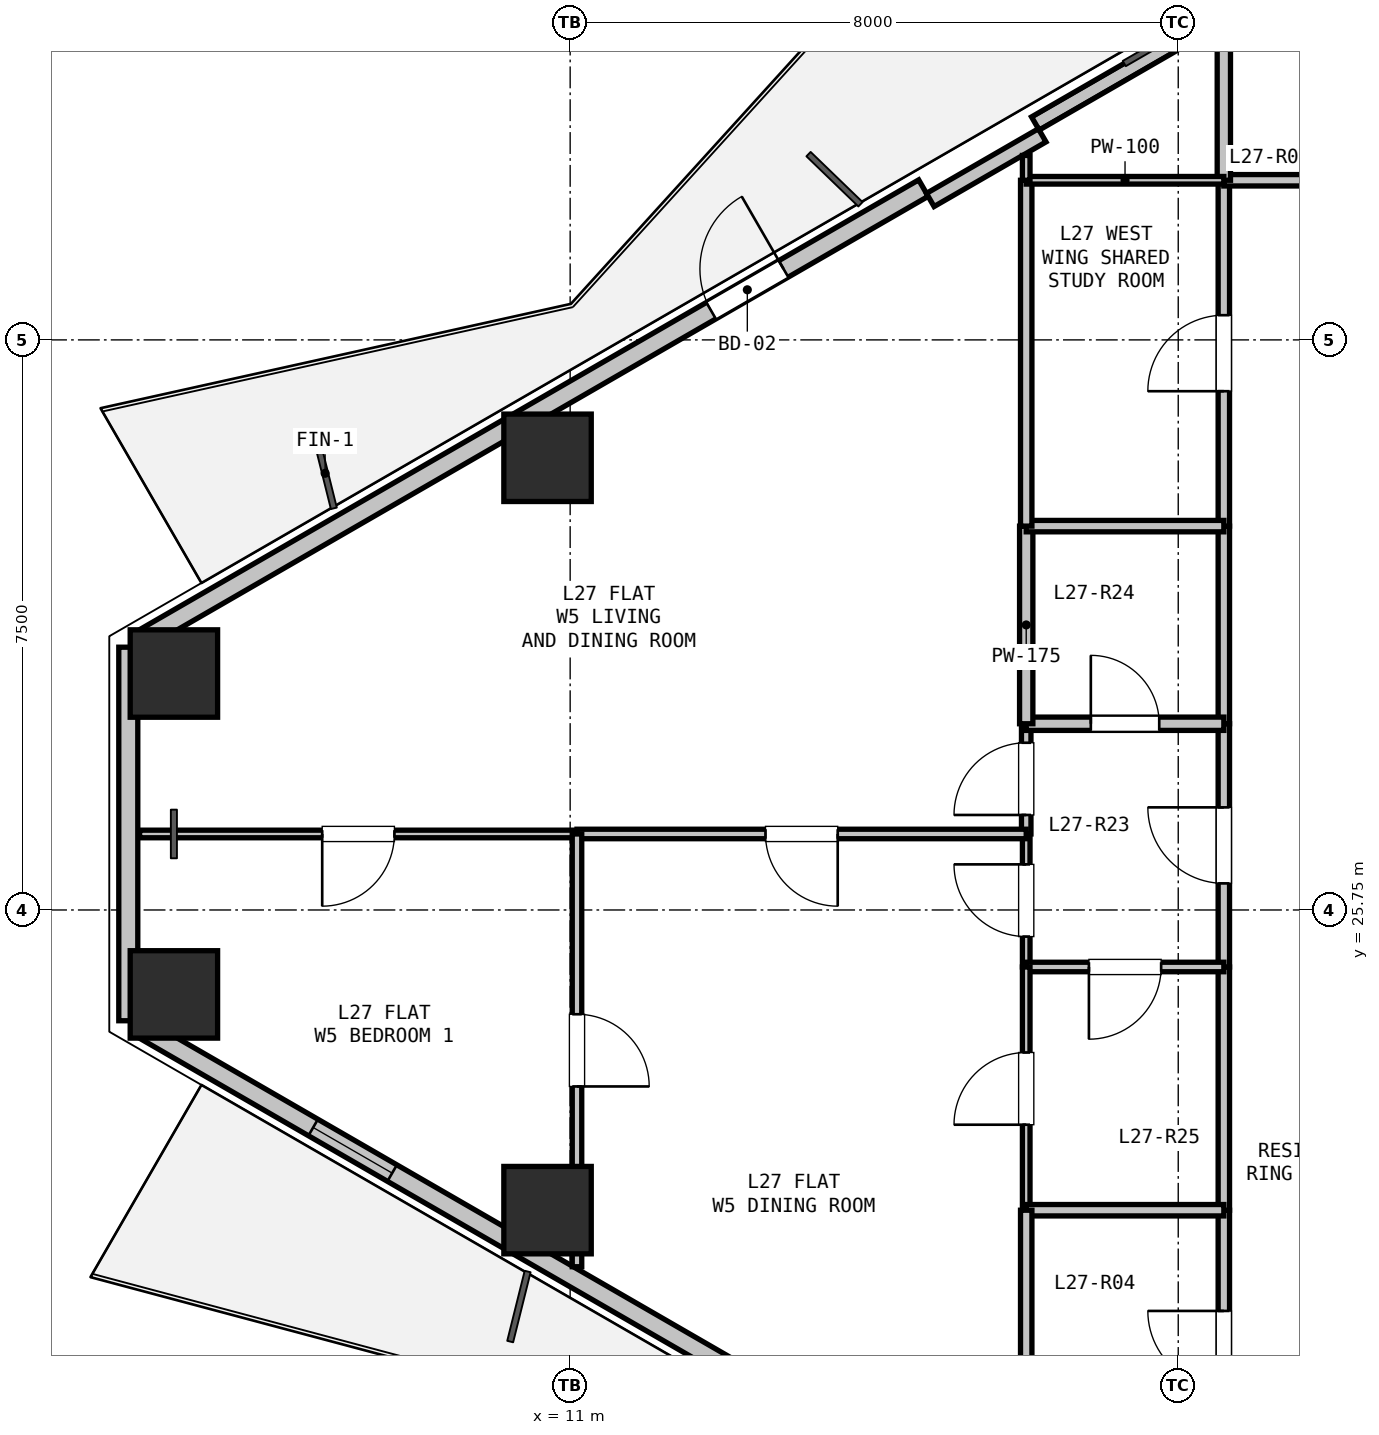
"""IFC4 building model, lengths in metres.
Left out: names, types, materials, properties, quantities, classifications, styles, units other than length and angle.
Written with IfcOpenShell. Run it as: python <this file> out.ifc"""

import sys

from ifc_helpers import new_model, si_unit, direction, frame, frame_2d, origin, origin_2d, place, context, subcontext, project, spatial, rectangle, hollow_rectangle, extrude, element, fill, save


model = new_model("IFC4")
c1 = context("Model", 3, precision=1e-05, world=origin(), true_north=direction((0.0, 1.0)))
c2 = subcontext(c1, "Body", "Model", "MODEL_VIEW")
j1 = project(units=[si_unit("LENGTHUNIT", "METRE"), si_unit("PLANEANGLEUNIT", "RADIAN")], contexts=[c1])
p1 = place(None, origin())
s1 = spatial("IfcSite", under=j1, at=p1, CompositionType="ELEMENT")
p2 = place(p1, origin())
s2 = spatial("IfcBuilding", under=s1, at=p2, CompositionType="ELEMENT")
p3 = place(p2, frame((0.0, 0.0, 99.9)))
s3 = spatial("IfcBuildingStorey", under=s2, at=p3, CompositionType="ELEMENT", Elevation=99.9)
for number, where, z_axis, x_axis in (
    (1, (5.787, 28.861, 0.0), (0.0, 0.0, 1.0), (1.0, 0.0, 0.0)),
    (2, (10.702, 31.699, 0.0), (0.0, 0.0, 1.0), (1.0, 0.0, 0.0)),
    (3, (10.702, 21.801, 0.0), (0.0, 0.0, 1.0), (1.0, 0.0, 0.0)),
    (4, (5.787, 24.639, 0.0), (0.0, 0.0, 1.0), (1.0, 0.0, 0.0)),
):
    element("IfcColumn", number, at=place(p3, frame(where, z_axis=z_axis, x_axis=x_axis)), inside=s3, PredefinedType="COLUMN", context=c2, shape_type="SweptSolid", body=[
        extrude(hollow_rectangle(XDim=1.15, YDim=1.15, WallThickness=0.032, at=origin_2d()), origin(), (0.0, 0.0, 1.0), 3.3),
    ])
p4 = place(p3, frame((5.187, 24.293, 0.0), z_axis=(0.0, 0.0, 1.0), x_axis=(0.0, 1.0, 0.0)))
e5 = element("IfcWall", 5, at=p4, inside=s3, PredefinedType="SOLIDWALL", context=c2, shape_type="SweptSolid", body=[
    extrude(rectangle(XDim=4.915, YDim=0.25, at=frame_2d((2.457, 0.0))), origin(), (0.0, 0.0, 1.0), 2.67),
])
p5 = place(p3, frame((5.317, 29.282, 0.0), z_axis=(0.0, 0.0, 1.0), x_axis=(0.866023023012, 0.500004123596, 0.0)))
e6 = element("IfcWall", 6, at=p5, inside=s3, PredefinedType="SOLIDWALL", context=c2, shape_type="SweptSolid", body=[
    extrude(rectangle(XDim=11.93, YDim=0.25, at=frame_2d((5.965, 0.0))), origin(), (0.0, 0.0, 1.0), 2.67),
])
p6 = place(p5, frame((8.704, 0.0, 0.0)))
e7 = element("IfcOpeningElement", 7, at=p6, cuts=e6, PredefinedType="OPENING", context=c2, shape_type="SweptSolid", body=[
    extrude(rectangle(XDim=1.1, YDim=2.1, at=frame_2d((0.55, 1.05))), frame((0.0, 0.135, 0.0), z_axis=(0.0, -1.0, 0.0), x_axis=(1.0, 0.0, 0.0)), (0.0, 0.0, 1.0), 0.27),
])
p7 = place(p3, frame((17.12, 36.097, 0.0), z_axis=(0.0, 0.0, 1.0), x_axis=(0.866027010039, 0.499997217876, 0.0)))
e8 = element("IfcWall", 8, at=p7, inside=s3, PredefinedType="PARAPET", context=c2, shape_type="SweptSolid", body=[
    extrude(rectangle(XDim=11.229, YDim=0.2, at=frame_2d((5.615, 0.0))), origin(), (0.0, 0.0, 1.0), 0.2),
])
p8 = place(p3, frame((15.738, 35.091, 0.0), z_axis=(0.0, 0.0, 1.0), x_axis=(0.866025371046, 0.500000056704, 0.0)))
e9 = element("IfcWall", 9, at=p8, inside=s3, PredefinedType="PARAPET", context=c2, shape_type="SweptSolid", body=[
    extrude(rectangle(XDim=1.7, YDim=0.2, at=frame_2d((0.85, 0.0))), origin(), (0.0, 0.0, 1.0), 2.67),
])
p9 = place(p3, frame((15.648, 18.253, 0.0), z_axis=(0.0, 0.0, 1.0), x_axis=(-0.866023023012, 0.500004123596, 0.0)))
e10 = element("IfcWall", 10, at=p9, inside=s3, PredefinedType="SOLIDWALL", context=c2, shape_type="SweptSolid", body=[
    extrude(rectangle(XDim=11.93, YDim=0.25, at=frame_2d((5.965, 0.0))), origin(), (0.0, 0.0, 1.0), 2.67),
])
p10 = place(p9, frame((8.071, 0.0, 0.9)))
e11 = element("IfcOpeningElement", 11, at=p10, cuts=e10, PredefinedType="OPENING", context=c2, shape_type="SweptSolid", body=[
    extrude(rectangle(XDim=1.2, YDim=1.4, at=frame_2d((0.6, 0.7))), frame((0.0, 0.135, 0.0), z_axis=(0.0, -1.0, 0.0), x_axis=(1.0, 0.0, 0.0)), (0.0, 0.0, 1.0), 0.27),
])
p11 = place(p3, frame((19.6, 18.15, 0.0), z_axis=(0.0, 0.0, 1.0), x_axis=(0.0, 1.0, 0.0)))
e12 = element("IfcWall", 12, at=p11, inside=s3, PredefinedType="PARTITIONING", context=c2, shape_type="SweptSolid", body=[
    extrude(rectangle(XDim=3.65, YDim=0.15, at=frame_2d((1.825, 0.0))), origin(), (0.0, 0.0, 1.0), 2.423),
])
p12 = place(p11, frame((1.325, 0.0, 0.0)))
e13 = element("IfcOpeningElement", 13, at=p12, cuts=e12, PredefinedType="OPENING", context=c2, shape_type="SweptSolid", body=[
    extrude(rectangle(XDim=1.0, YDim=2.15, at=frame_2d((0.5, 1.075))), frame((0.0, 0.085, 0.0), z_axis=(0.0, -1.0, 0.0), x_axis=(1.0, 0.0, 0.0)), (0.0, 0.0, 1.0), 0.17),
])
p13 = place(p3, frame((19.6, 21.8, 0.0), z_axis=(0.0, 0.0, 1.0), x_axis=(0.0, 1.0, 0.0)))
e14 = element("IfcWall", 14, at=p13, inside=s3, PredefinedType="PARTITIONING", context=c2, shape_type="SweptSolid", body=[
    extrude(rectangle(XDim=3.2, YDim=0.15, at=frame_2d((1.6, 0.0))), origin(), (0.0, 0.0, 1.0), 3.05),
])
p14 = place(p3, frame((19.6, 25.0, 0.0), z_axis=(0.0, 0.0, 1.0), x_axis=(0.0, 1.0, 0.0)))
e15 = element("IfcWall", 15, at=p14, inside=s3, PredefinedType="PARTITIONING", context=c2, shape_type="SweptSolid", body=[
    extrude(rectangle(XDim=3.2, YDim=0.15, at=frame_2d((1.6, 0.0))), origin(), (0.0, 0.0, 1.0), 3.05),
])
p15 = place(p14, frame((1.1, 0.0, 0.0)))
e16 = element("IfcOpeningElement", 16, at=p15, cuts=e15, PredefinedType="OPENING", context=c2, shape_type="SweptSolid", body=[
    extrude(rectangle(XDim=1.0, YDim=2.15, at=frame_2d((0.5, 1.075))), frame((0.0, 0.085, 0.0), z_axis=(0.0, -1.0, 0.0), x_axis=(1.0, 0.0, 0.0)), (0.0, 0.0, 1.0), 0.17),
])
p16 = place(p3, frame((19.6, 28.2, 0.0), z_axis=(0.0, 0.0, 1.0), x_axis=(0.0, 1.0, 0.0)))
e17 = element("IfcWall", 17, at=p16, inside=s3, PredefinedType="PARTITIONING", context=c2, shape_type="SweptSolid", body=[
    extrude(rectangle(XDim=2.6, YDim=0.15, at=frame_2d((1.3, 0.0))), origin(), (0.0, 0.0, 1.0), 3.05),
])
p17 = place(p3, frame((19.6, 30.8, 0.0), z_axis=(0.0, 0.0, 1.0), x_axis=(0.0, 1.0, 0.0)))
e18 = element("IfcWall", 18, at=p17, inside=s3, PredefinedType="PARTITIONING", context=c2, shape_type="SweptSolid", body=[
    extrude(rectangle(XDim=4.55, YDim=0.15, at=frame_2d((2.275, 0.0))), origin(), (0.0, 0.0, 1.0), 2.423),
])
p18 = place(p17, frame((1.775, 0.0, 0.0)))
e19 = element("IfcOpeningElement", 19, at=p18, cuts=e18, PredefinedType="OPENING", context=c2, shape_type="SweptSolid", body=[
    extrude(rectangle(XDim=1.0, YDim=2.15, at=frame_2d((0.5, 1.075))), frame((0.0, 0.085, 0.0), z_axis=(0.0, -1.0, 0.0), x_axis=(1.0, 0.0, 0.0)), (0.0, 0.0, 1.0), 0.17),
])
p19 = place(p3, frame((19.6, 35.35, 0.0), z_axis=(0.0, 0.0, 1.0), x_axis=(1.0, 0.0, 0.0)))
e20 = element("IfcWall", 20, at=p19, inside=s3, PredefinedType="PARTITIONING", context=c2, shape_type="SweptSolid", body=[
    extrude(rectangle(XDim=2.0, YDim=0.15, at=frame_2d((1.0, 0.0))), origin(), (0.0, 0.0, 1.0), 3.05),
])
p20 = place(p3, frame((17.0, 25.0, 0.0), z_axis=(0.0, 0.0, 1.0), x_axis=(0.0, 1.0, 0.0)))
e21 = element("IfcWall", 21, at=p20, inside=s3, PredefinedType="PARTITIONING", context=c2, shape_type="SweptSolid", body=[
    extrude(rectangle(XDim=1.75, YDim=0.1, at=frame_2d((0.875, 0.0))), origin(), (0.0, 0.0, 1.0), 3.05),
])
p21 = place(p20, frame((0.4, 0.0, 0.0)))
e22 = element("IfcOpeningElement", 22, at=p21, cuts=e21, PredefinedType="OPENING", context=c2, shape_type="SweptSolid", body=[
    extrude(rectangle(XDim=0.95, YDim=2.1, at=frame_2d((0.475, 1.05))), frame((0.0, 0.06, 0.0), z_axis=(0.0, -1.0, 0.0), x_axis=(1.0, 0.0, 0.0)), (0.0, 0.0, 1.0), 0.12),
])
p22 = place(p3, frame((17.0, 26.75, 0.0), z_axis=(0.0, 0.0, 1.0), x_axis=(0.0, 1.0, 0.0)))
e23 = element("IfcWall", 23, at=p22, inside=s3, PredefinedType="PARTITIONING", context=c2, shape_type="SweptSolid", body=[
    extrude(rectangle(XDim=1.45, YDim=0.125, at=frame_2d((0.725, 0.0))), origin(), (0.0, 0.0, 1.0), 3.05),
])
p23 = place(p22, frame((0.25, 0.0, 0.0)))
e24 = element("IfcOpeningElement", 24, at=p23, cuts=e23, PredefinedType="OPENING", context=c2, shape_type="SweptSolid", body=[
    extrude(rectangle(XDim=0.95, YDim=2.1, at=frame_2d((0.475, 1.05))), frame((0.0, 0.073, 0.0), z_axis=(0.0, -1.0, 0.0), x_axis=(1.0, 0.0, 0.0)), (0.0, 0.0, 1.0), 0.145),
])
p24 = place(p3, frame((17.0, 28.2, 0.0), z_axis=(0.0, 0.0, 1.0), x_axis=(1.0, 0.0, 0.0)))
e25 = element("IfcWall", 25, at=p24, inside=s3, PredefinedType="PLUMBINGWALL", context=c2, shape_type="SweptSolid", body=[
    extrude(rectangle(XDim=2.6, YDim=0.175, at=frame_2d((1.3, 0.0))), origin(), (0.0, 0.0, 1.0), 3.05),
])
p25 = place(p24, frame((0.85, 0.0, 0.0)))
e26 = element("IfcOpeningElement", 26, at=p25, cuts=e25, PredefinedType="OPENING", context=c2, shape_type="SweptSolid", body=[
    extrude(rectangle(XDim=0.9, YDim=2.1, at=frame_2d((0.45, 1.05))), frame((0.0, 0.097, 0.0), z_axis=(0.0, -1.0, 0.0), x_axis=(1.0, 0.0, 0.0)), (0.0, 0.0, 1.0), 0.195),
])
p26 = place(p3, frame((19.6, 25.0, 0.0), z_axis=(0.0, 0.0, 1.0), x_axis=(-1.0, 0.0, 0.0)))
e27 = element("IfcWall", 27, at=p26, inside=s3, PredefinedType="PARTITIONING", context=c2, shape_type="SweptSolid", body=[
    extrude(rectangle(XDim=2.6, YDim=0.125, at=frame_2d((1.3, 0.0))), origin(), (0.0, 0.0, 1.0), 3.05),
])
p27 = place(p26, frame((0.825, 0.0, 0.0)))
e28 = element("IfcOpeningElement", 28, at=p27, cuts=e27, PredefinedType="OPENING", context=c2, shape_type="SweptSolid", body=[
    extrude(rectangle(XDim=0.95, YDim=2.1, at=frame_2d((0.475, 1.05))), frame((0.0, 0.073, 0.0), z_axis=(0.0, -1.0, 0.0), x_axis=(1.0, 0.0, 0.0)), (0.0, 0.0, 1.0), 0.145),
])
p28 = place(p3, frame((19.6, 35.35, 0.0), z_axis=(0.0, 0.0, 1.0), x_axis=(0.0, 1.0, 0.0)))
e29 = element("IfcWall", 29, at=p28, inside=s3, PredefinedType="PLUMBINGWALL", context=c2, shape_type="SweptSolid", body=[
    extrude(rectangle(XDim=2.137, YDim=0.175, at=frame_2d((1.068, 0.0))), origin(), (0.0, 0.0, 1.0), 2.365),
])
p29 = place(p3, frame((17.0, 28.2, 0.0), z_axis=(0.0, 0.0, 1.0), x_axis=(0.0, 1.0, 0.0)))
e30 = element("IfcWall", 30, at=p29, inside=s3, PredefinedType="PLUMBINGWALL", context=c2, shape_type="SweptSolid", body=[
    extrude(rectangle(XDim=2.6, YDim=0.175, at=frame_2d((1.3, 0.0))), origin(), (0.0, 0.0, 1.0), 3.05),
])
p30 = place(p3, frame((17.0, 30.8, 0.0), z_axis=(0.0, 0.0, 1.0), x_axis=(1.0, 0.0, 0.0)))
e31 = element("IfcWall", 31, at=p30, inside=s3, PredefinedType="PARTITIONING", context=c2, shape_type="SweptSolid", body=[
    extrude(rectangle(XDim=2.6, YDim=0.15, at=frame_2d((1.3, 0.0))), origin(), (0.0, 0.0, 1.0), 3.05),
])
p31 = place(p3, frame((17.0, 21.8, 0.0), z_axis=(0.0, 0.0, 1.0), x_axis=(0.0, 1.0, 0.0)))
e32 = element("IfcWall", 32, at=p31, inside=s3, PredefinedType="PARTITIONING", context=c2, shape_type="SweptSolid", body=[
    extrude(rectangle(XDim=3.2, YDim=0.1, at=frame_2d((1.6, 0.0))), origin(), (0.0, 0.0, 1.0), 2.423),
])
p32 = place(p31, frame((1.125, 0.0, 0.0)))
e33 = element("IfcOpeningElement", 33, at=p32, cuts=e32, PredefinedType="OPENING", context=c2, shape_type="SweptSolid", body=[
    extrude(rectangle(XDim=0.95, YDim=2.1, at=frame_2d((0.475, 1.05))), frame((0.0, 0.06, 0.0), z_axis=(0.0, -1.0, 0.0), x_axis=(1.0, 0.0, 0.0)), (0.0, 0.0, 1.0), 0.12),
])
p33 = place(p3, frame((19.6, 21.8, 0.0), z_axis=(0.0, 0.0, 1.0), x_axis=(-1.0, 0.0, 0.0)))
e34 = element("IfcWall", 34, at=p33, inside=s3, PredefinedType="PARTITIONING", context=c2, shape_type="SweptSolid", body=[
    extrude(rectangle(XDim=2.6, YDim=0.15, at=frame_2d((1.3, 0.0))), origin(), (0.0, 0.0, 1.0), 2.423),
])
p34 = place(p3, frame((17.0, 30.8, 0.0), z_axis=(0.0, 0.0, 1.0), x_axis=(0.0, 1.0, 0.0)))
e35 = element("IfcWall", 35, at=p34, inside=s3, PredefinedType="PARTITIONING", context=c2, shape_type="SweptSolid", body=[
    extrude(rectangle(XDim=4.55, YDim=0.15, at=frame_2d((2.275, 0.0))), origin(), (0.0, 0.0, 1.0), 2.365),
])
p35 = place(p3, frame((17.0, 35.35, 0.0), z_axis=(0.0, 0.0, 1.0), x_axis=(1.0, 0.0, 0.0)))
e36 = element("IfcWall", 36, at=p35, inside=s3, PredefinedType="PARTITIONING", context=c2, shape_type="SweptSolid", body=[
    extrude(rectangle(XDim=2.6, YDim=0.1, at=frame_2d((1.3, 0.0))), origin(), (0.0, 0.0, 1.0), 2.365),
])
p36 = place(p3, frame((17.0, 17.823, 0.0), z_axis=(0.0, 0.0, 1.0), x_axis=(0.0, 1.0, 0.0)))
e37 = element("IfcWall", 37, at=p36, inside=s3, PredefinedType="PARTITIONING", context=c2, shape_type="SweptSolid", body=[
    extrude(rectangle(XDim=3.977, YDim=0.15, at=frame_2d((1.988, 0.0))), origin(), (0.0, 0.0, 1.0), 2.365),
])
p37 = place(p3, frame((17.0, 35.677, 0.0), z_axis=(0.0, 0.0, 1.0), x_axis=(0.0, -1.0, 0.0)))
e38 = element("IfcWall", 38, at=p37, inside=s3, PredefinedType="PARTITIONING", context=c2, shape_type="SweptSolid", body=[
    extrude(rectangle(XDim=0.326, YDim=0.1, at=frame_2d((0.163, 0.0))), origin(), (0.0, 0.0, 1.0), 2.365),
])
p38 = place(p3, frame((17.0, 26.75, 0.0), z_axis=(0.0, 0.0, 1.0), x_axis=(-1.0, 0.0, 0.0)))
e39 = element("IfcWall", 39, at=p38, inside=s3, PredefinedType="PARTITIONING", context=c2, shape_type="SweptSolid", body=[
    extrude(rectangle(XDim=5.91, YDim=0.125, at=frame_2d((2.955, 0.0))), origin(), (0.0, 0.0, 1.0), 3.05),
])
p39 = place(p38, frame((2.48, 0.0, 0.0)))
e40 = element("IfcOpeningElement", 40, at=p39, cuts=e39, PredefinedType="OPENING", context=c2, shape_type="SweptSolid", body=[
    extrude(rectangle(XDim=0.95, YDim=2.1, at=frame_2d((0.475, 1.05))), frame((0.0, 0.073, 0.0), z_axis=(0.0, -1.0, 0.0), x_axis=(1.0, 0.0, 0.0)), (0.0, 0.0, 1.0), 0.145),
])
p40 = place(p3, frame((11.09, 26.75, 0.0), z_axis=(0.0, 0.0, 1.0), x_axis=(-1.0, 0.0, 0.0)))
e41 = element("IfcWall", 41, at=p40, inside=s3, PredefinedType="PARTITIONING", context=c2, shape_type="SweptSolid", body=[
    extrude(rectangle(XDim=5.754, YDim=0.1, at=frame_2d((2.877, 0.0))), origin(), (0.0, 0.0, 1.0), 2.715),
])
p41 = place(p40, frame((2.402, 0.0, 0.0)))
e42 = element("IfcOpeningElement", 42, at=p41, cuts=e41, PredefinedType="OPENING", context=c2, shape_type="SweptSolid", body=[
    extrude(rectangle(XDim=0.95, YDim=2.1, at=frame_2d((0.475, 1.05))), frame((0.0, 0.06, 0.0), z_axis=(0.0, -1.0, 0.0), x_axis=(1.0, 0.0, 0.0)), (0.0, 0.0, 1.0), 0.12),
])
p42 = place(p3, frame((11.09, 26.75, 0.0), z_axis=(0.0, 0.0, 1.0), x_axis=(0.0, -1.0, 0.0)))
e43 = element("IfcWall", 43, at=p42, inside=s3, PredefinedType="PARTITIONING", context=c2, shape_type="SweptSolid", body=[
    extrude(rectangle(XDim=5.693, YDim=0.125, at=frame_2d((2.847, 0.0))), origin(), (0.0, 0.0, 1.0), 2.423),
])
p43 = place(p42, frame((2.372, 0.0, 0.0)))
e44 = element("IfcOpeningElement", 44, at=p43, cuts=e43, PredefinedType="OPENING", context=c2, shape_type="SweptSolid", body=[
    extrude(rectangle(XDim=0.95, YDim=2.1, at=frame_2d((0.475, 1.05))), frame((0.0, 0.073, 0.0), z_axis=(0.0, -1.0, 0.0), x_axis=(1.0, 0.0, 0.0)), (0.0, 0.0, 1.0), 0.145),
])
p44 = place(p6, origin())
e45 = element("IfcDoor", 45, at=p44, inside=s3, OperationType="SINGLE_SWING_RIGHT", PredefinedType="DOOR", context=c2, shape_type="SweptSolid", body=[
    extrude(rectangle(XDim=1.1, YDim=2.1, at=frame_2d((0.55, 1.05))), frame((0.0, 0.025, 0.0), z_axis=(0.0, -1.0, 0.0), x_axis=(1.0, 0.0, 0.0)), (0.0, 0.0, 1.0), 0.05),
])
fill(e7, e45)
p45 = place(p10, origin())
e46 = element("IfcWindow", 46, at=p45, inside=s3, PartitioningType="SINGLE_PANEL", PredefinedType="WINDOW", context=c2, shape_type="SweptSolid", body=[
    extrude(rectangle(XDim=1.2, YDim=1.4, at=frame_2d((0.6, 0.7))), frame((0.0, 0.03, 0.0), z_axis=(0.0, -1.0, 0.0), x_axis=(1.0, 0.0, 0.0)), (0.0, 0.0, 1.0), 0.06),
])
fill(e11, e46)
p46 = place(p15, origin())
e47 = element("IfcDoor", 47, at=p46, inside=s3, OperationType="SINGLE_SWING_RIGHT", PredefinedType="DOOR", context=c2, shape_type="SweptSolid", body=[
    extrude(rectangle(XDim=1.0, YDim=2.15, at=frame_2d((0.5, 1.075))), frame((0.0, 0.025, 0.0), z_axis=(0.0, -1.0, 0.0), x_axis=(1.0, 0.0, 0.0)), (0.0, 0.0, 1.0), 0.05),
])
fill(e16, e47)
p47 = place(p18, origin())
e48 = element("IfcDoor", 48, at=p47, inside=s3, OperationType="SINGLE_SWING_LEFT", PredefinedType="DOOR", context=c2, shape_type="SweptSolid", body=[
    extrude(rectangle(XDim=1.0, YDim=2.15, at=frame_2d((0.5, 1.075))), frame((0.0, 0.025, 0.0), z_axis=(0.0, -1.0, 0.0), x_axis=(1.0, 0.0, 0.0)), (0.0, 0.0, 1.0), 0.05),
])
fill(e19, e48)
p48 = place(p12, origin())
e49 = element("IfcDoor", 49, at=p48, inside=s3, OperationType="SINGLE_SWING_RIGHT", PredefinedType="DOOR", context=c2, shape_type="SweptSolid", body=[
    extrude(rectangle(XDim=1.0, YDim=2.15, at=frame_2d((0.5, 1.075))), frame((0.0, 0.025, 0.0), z_axis=(0.0, -1.0, 0.0), x_axis=(1.0, 0.0, 0.0)), (0.0, 0.0, 1.0), 0.05),
])
fill(e13, e49)
p49 = place(p25, origin())
e50 = element("IfcDoor", 50, at=p49, inside=s3, OperationType="SINGLE_SWING_LEFT", PredefinedType="DOOR", context=c2, shape_type="SweptSolid", body=[
    extrude(rectangle(XDim=0.9, YDim=2.1, at=frame_2d((0.45, 1.05))), frame((0.0, 0.025, 0.0), z_axis=(0.0, -1.0, 0.0), x_axis=(1.0, 0.0, 0.0)), (0.0, 0.0, 1.0), 0.05),
])
fill(e26, e50)
p50 = place(p27, origin())
e51 = element("IfcDoor", 51, at=p50, inside=s3, OperationType="SINGLE_SWING_RIGHT", PredefinedType="DOOR", context=c2, shape_type="SweptSolid", body=[
    extrude(rectangle(XDim=0.95, YDim=2.1, at=frame_2d((0.475, 1.05))), frame((0.0, 0.025, 0.0), z_axis=(0.0, -1.0, 0.0), x_axis=(1.0, 0.0, 0.0)), (0.0, 0.0, 1.0), 0.05),
])
fill(e28, e51)
p51 = place(p23, origin())
e52 = element("IfcDoor", 52, at=p51, inside=s3, OperationType="SINGLE_SWING_LEFT", PredefinedType="DOOR", context=c2, shape_type="SweptSolid", body=[
    extrude(rectangle(XDim=0.95, YDim=2.1, at=frame_2d((0.475, 1.05))), frame((0.0, 0.025, 0.0), z_axis=(0.0, -1.0, 0.0), x_axis=(1.0, 0.0, 0.0)), (0.0, 0.0, 1.0), 0.05),
])
fill(e24, e52)
p52 = place(p21, origin())
e53 = element("IfcDoor", 53, at=p52, inside=s3, OperationType="SINGLE_SWING_RIGHT", PredefinedType="DOOR", context=c2, shape_type="SweptSolid", body=[
    extrude(rectangle(XDim=0.95, YDim=2.1, at=frame_2d((0.475, 1.05))), frame((0.0, 0.025, 0.0), z_axis=(0.0, -1.0, 0.0), x_axis=(1.0, 0.0, 0.0)), (0.0, 0.0, 1.0), 0.05),
])
fill(e22, e53)
p53 = place(p32, origin())
e54 = element("IfcDoor", 54, at=p53, inside=s3, OperationType="SINGLE_SWING_LEFT", PredefinedType="DOOR", context=c2, shape_type="SweptSolid", body=[
    extrude(rectangle(XDim=0.95, YDim=2.1, at=frame_2d((0.475, 1.05))), frame((0.0, 0.025, 0.0), z_axis=(0.0, -1.0, 0.0), x_axis=(1.0, 0.0, 0.0)), (0.0, 0.0, 1.0), 0.05),
])
fill(e33, e54)
p54 = place(p41, origin())
e55 = element("IfcDoor", 55, at=p54, inside=s3, OperationType="SINGLE_SWING_RIGHT", PredefinedType="DOOR", context=c2, shape_type="SweptSolid", body=[
    extrude(rectangle(XDim=0.95, YDim=2.1, at=frame_2d((0.475, 1.05))), frame((0.0, 0.025, 0.0), z_axis=(0.0, -1.0, 0.0), x_axis=(1.0, 0.0, 0.0)), (0.0, 0.0, 1.0), 0.05),
])
fill(e42, e55)
p55 = place(p39, origin())
e56 = element("IfcDoor", 56, at=p55, inside=s3, OperationType="SINGLE_SWING_LEFT", PredefinedType="DOOR", context=c2, shape_type="SweptSolid", body=[
    extrude(rectangle(XDim=0.95, YDim=2.1, at=frame_2d((0.475, 1.05))), frame((0.0, 0.025, 0.0), z_axis=(0.0, -1.0, 0.0), x_axis=(1.0, 0.0, 0.0)), (0.0, 0.0, 1.0), 0.05),
])
fill(e40, e56)
p56 = place(p43, origin())
e57 = element("IfcDoor", 57, at=p56, inside=s3, OperationType="SINGLE_SWING_RIGHT", PredefinedType="DOOR", context=c2, shape_type="SweptSolid", body=[
    extrude(rectangle(XDim=0.95, YDim=2.1, at=frame_2d((0.475, 1.05))), frame((0.0, 0.025, 0.0), z_axis=(0.0, -1.0, 0.0), x_axis=(1.0, 0.0, 0.0)), (0.0, 0.0, 1.0), 0.05),
])
fill(e44, e57)
save(model, sys.argv[1])
